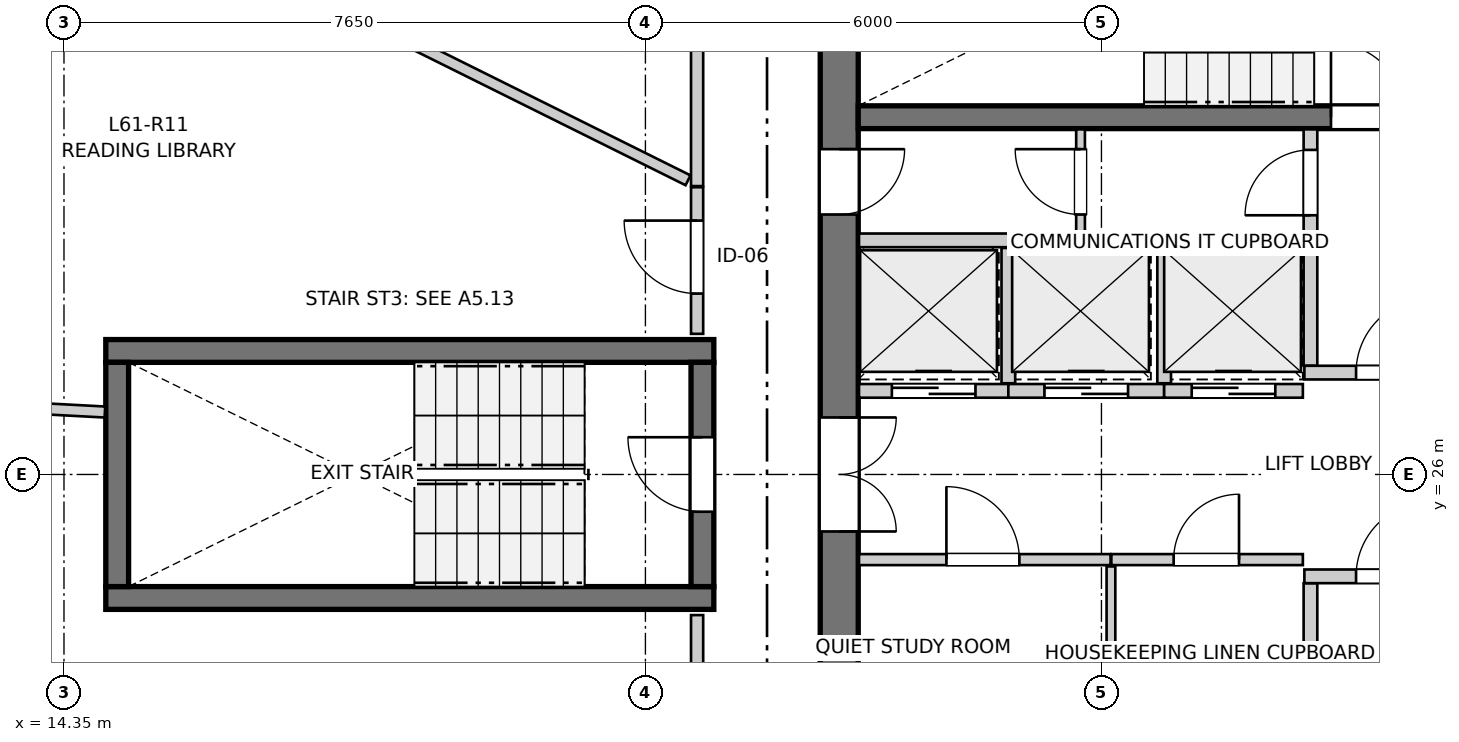
"""IFC4 building model, lengths in metres.
Left out: names, types, materials, properties, quantities, classifications, styles, units other than length and angle.
Written with IfcOpenShell. Run it as: python <this file> out.ifc"""

import sys

from ifc_helpers import new_model, si_unit, direction, frame, frame_2d, origin, place, context, subcontext, project, spatial, rectangle, extrude, source, transform, mapped, element, fill, save


model = new_model("IFC4")
c1 = context("Model", 3, precision=1e-05, world=origin(), true_north=direction((0.0, 1.0)))
c2 = subcontext(c1, "Body", "Model", "MODEL_VIEW")
j1 = project(units=[si_unit("LENGTHUNIT", "METRE"), si_unit("PLANEANGLEUNIT", "RADIAN")], contexts=[c1])
p1 = place(None, origin())
s1 = spatial("IfcSite", under=j1, at=p1, CompositionType="ELEMENT")
p2 = place(p1, origin())
s2 = spatial("IfcBuilding", under=s1, at=p2, CompositionType="ELEMENT")
p3 = place(p2, frame((0.0, 0.0, 205.2)))
s3 = spatial("IfcBuildingStorey", under=s2, at=p3, CompositionType="ELEMENT", Elevation=205.2)
p4 = place(p3, frame((24.55, 33.8, 0.0), z_axis=(0.0, 0.0, 1.0), x_axis=(0.0, -1.0, 0.0)))
e1 = element("IfcWall", 1, at=p4, inside=s3, PredefinedType="SHEAR", context=c2, shape_type="SweptSolid", body=[
    extrude(rectangle(XDim=15.6, YDim=0.5, at=frame_2d((7.8, 0.0))), origin(), (0.0, 0.0, 1.0), 2.935),
])
p5 = place(p4, frame((7.05, 0.0, 0.0)))
e2 = element("IfcOpeningElement", 2, at=p5, cuts=e1, PredefinedType="OPENING", context=c2, shape_type="SweptSolid", body=[
    extrude(rectangle(XDim=1.5, YDim=2.15, at=frame_2d((0.75, 1.075))), frame((0.0, 0.26, 0.0), z_axis=(0.0, -1.0, 0.0), x_axis=(1.0, 0.0, 0.0)), (0.0, 0.0, 1.0), 0.52),
])
p6 = place(p4, frame((3.52, 0.0, 0.0)))
e3 = element("IfcOpeningElement", 3, at=p6, cuts=e1, PredefinedType="OPENING", context=c2, shape_type="SweptSolid", body=[
    extrude(rectangle(XDim=0.86, YDim=2.05, at=frame_2d((0.43, 1.025))), frame((0.0, 0.26, 0.0), z_axis=(0.0, -1.0, 0.0), x_axis=(1.0, 0.0, 0.0)), (0.0, 0.0, 1.0), 0.52),
])
p7 = place(p4, frame((11.22, 0.0, 0.0)))
e4 = element("IfcOpeningElement", 4, at=p7, cuts=e1, PredefinedType="OPENING", context=c2, shape_type="SweptSolid", body=[
    extrude(rectangle(XDim=0.86, YDim=2.05, at=frame_2d((0.43, 1.025))), frame((0.0, 0.26, 0.0), z_axis=(0.0, -1.0, 0.0), x_axis=(1.0, 0.0, 0.0)), (0.0, 0.0, 1.0), 0.52),
])
p8 = place(p3, frame((24.8, 30.7, 0.0), z_axis=(0.0, 0.0, 1.0), x_axis=(1.0, 0.0, 0.0)))
e5 = element("IfcWall", 5, at=p8, inside=s3, PredefinedType="SHEAR", context=c2, shape_type="SweptSolid", body=[
    extrude(rectangle(XDim=11.1, YDim=0.3, at=frame_2d((5.55, 0.0))), origin(), (0.0, 0.0, 1.0), 2.935),
])
p9 = place(p8, frame((6.22, 0.0, 0.0)))
e6 = element("IfcOpeningElement", 6, at=p9, cuts=e5, PredefinedType="OPENING", context=c2, shape_type="SweptSolid", body=[
    extrude(rectangle(XDim=0.98, YDim=2.15, at=frame_2d((0.49, 1.075))), frame((0.0, 0.16, 0.0), z_axis=(0.0, -1.0, 0.0), x_axis=(1.0, 0.0, 0.0)), (0.0, 0.0, 1.0), 0.32),
])
p10 = place(p8, frame((9.15, 0.0, 0.0)))
e7 = element("IfcOpeningElement", 7, at=p10, cuts=e5, PredefinedType="OPENING", context=c2, shape_type="SweptSolid", body=[
    extrude(rectangle(XDim=1.15, YDim=2.15, at=frame_2d((0.575, 1.075))), frame((0.0, 0.16, 0.0), z_axis=(0.0, -1.0, 0.0), x_axis=(1.0, 0.0, 0.0)), (0.0, 0.0, 1.0), 0.32),
])
for number, where, z_axis, x_axis in (
    (8, (14.9, 24.375, 0.0), (0.0, 0.0, 1.0), (1.0, 0.0, 0.0)),
    (9, (22.9, 27.625, 0.0), (0.0, 0.0, 1.0), (-1.0, 0.0, 0.0)),
):
    element("IfcWall", number, at=place(p3, frame(where, z_axis=z_axis, x_axis=x_axis)), inside=s3, PredefinedType="SHEAR", context=c2, shape_type="SweptSolid", body=[
        extrude(rectangle(XDim=8.0, YDim=0.3, at=frame_2d((4.0, 0.0))), origin(), (0.0, 0.0, 1.0), 2.935),
    ])
p11 = place(p3, frame((15.05, 27.475, 0.0), z_axis=(0.0, 0.0, 1.0), x_axis=(0.0, -1.0, 0.0)))
e10 = element("IfcWall", 10, at=p11, inside=s3, PredefinedType="SHEAR", context=c2, shape_type="SweptSolid", body=[
    extrude(rectangle(XDim=2.95, YDim=0.3, at=frame_2d((1.475, 0.0))), origin(), (0.0, 0.0, 1.0), 2.935),
])
p12 = place(p3, frame((22.75, 24.525, 0.0), z_axis=(0.0, 0.0, 1.0), x_axis=(0.0, 1.0, 0.0)))
e11 = element("IfcWall", 11, at=p12, inside=s3, PredefinedType="SHEAR", context=c2, shape_type="SweptSolid", body=[
    extrude(rectangle(XDim=2.95, YDim=0.3, at=frame_2d((1.475, 0.0))), origin(), (0.0, 0.0, 1.0), 2.935),
])
p13 = place(p12, frame((0.985, 0.0, 0.0)))
e12 = element("IfcOpeningElement", 12, at=p13, cuts=e11, PredefinedType="OPENING", context=c2, shape_type="SweptSolid", body=[
    extrude(rectangle(XDim=0.98, YDim=2.15, at=frame_2d((0.49, 1.075))), frame((0.0, 0.16, 0.0), z_axis=(0.0, -1.0, 0.0), x_axis=(1.0, 0.0, 0.0)), (0.0, 0.0, 1.0), 0.32),
])
p14 = place(p3, frame((30.75, 21.46, 0.0), z_axis=(0.0, 0.0, 1.0), x_axis=(0.0, 1.0, 0.0)))
e13 = element("IfcWall", 13, at=p14, inside=s3, PredefinedType="PARTITIONING", context=c2, shape_type="SweptSolid", body=[
    extrude(rectangle(XDim=3.11, YDim=0.18, at=frame_2d((1.555, 0.0))), origin(), (0.0, 0.0, 1.0), 2.935),
])
p15 = place(p14, frame((0.26, 0.0, 0.0)))
e14 = element("IfcOpeningElement", 14, at=p15, cuts=e13, PredefinedType="OPENING", context=c2, shape_type="SweptSolid", body=[
    extrude(rectangle(XDim=0.86, YDim=2.05, at=frame_2d((0.43, 1.025))), frame((0.0, 0.1, 0.0), z_axis=(0.0, -1.0, 0.0), x_axis=(1.0, 0.0, 0.0)), (0.0, 0.0, 1.0), 0.2),
])
p16 = place(p3, frame((30.67, 24.66, 0.0), z_axis=(0.0, 0.0, 1.0), x_axis=(1.0, 0.0, 0.0)))
e15 = element("IfcWall", 15, at=p16, inside=s3, PredefinedType="PARTITIONING", context=c2, shape_type="SweptSolid", body=[
    extrude(rectangle(XDim=5.22, YDim=0.18, at=frame_2d((2.61, 0.0))), origin(), (0.0, 0.0, 1.0), 2.935),
])
p17 = place(p16, frame((0.68, 0.0, 0.0)))
e16 = element("IfcOpeningElement", 16, at=p17, cuts=e15, PredefinedType="OPENING", context=c2, shape_type="SweptSolid", body=[
    extrude(rectangle(XDim=0.98, YDim=2.15, at=frame_2d((0.49, 1.075))), frame((0.0, 0.1, 0.0), z_axis=(0.0, -1.0, 0.0), x_axis=(1.0, 0.0, 0.0)), (0.0, 0.0, 1.0), 0.2),
])
p18 = place(p3, frame((30.75, 27.43, 0.0), z_axis=(0.0, 0.0, 1.0), x_axis=(0.0, 1.0, 0.0)))
e17 = element("IfcWall", 17, at=p18, inside=s3, PredefinedType="PARTITIONING", context=c2, shape_type="SweptSolid", body=[
    extrude(rectangle(XDim=3.11, YDim=0.18, at=frame_2d((1.555, 0.0))), origin(), (0.0, 0.0, 1.0), 2.935),
])
p19 = place(p18, frame((1.98, 0.0, 0.0)))
e18 = element("IfcOpeningElement", 18, at=p19, cuts=e17, PredefinedType="OPENING", context=c2, shape_type="SweptSolid", body=[
    extrude(rectangle(XDim=0.86, YDim=2.05, at=frame_2d((0.43, 1.025))), frame((0.0, 0.1, 0.0), z_axis=(0.0, -1.0, 0.0), x_axis=(1.0, 0.0, 0.0)), (0.0, 0.0, 1.0), 0.2),
])
p20 = place(p3, frame((30.67, 27.34, 0.0), z_axis=(0.0, 0.0, 1.0), x_axis=(1.0, 0.0, 0.0)))
e19 = element("IfcWall", 19, at=p20, inside=s3, PredefinedType="PARTITIONING", context=c2, shape_type="SweptSolid", body=[
    extrude(rectangle(XDim=5.22, YDim=0.18, at=frame_2d((2.61, 0.0))), origin(), (0.0, 0.0, 1.0), 2.935),
])
p21 = place(p20, frame((0.68, 0.0, 0.0)))
e20 = element("IfcOpeningElement", 20, at=p21, cuts=e19, PredefinedType="OPENING", context=c2, shape_type="SweptSolid", body=[
    extrude(rectangle(XDim=0.98, YDim=2.15, at=frame_2d((0.49, 1.075))), frame((0.0, 0.1, 0.0), z_axis=(0.0, -1.0, 0.0), x_axis=(1.0, 0.0, 0.0)), (0.0, 0.0, 1.0), 0.2),
])
p22 = place(p3, frame((24.81, 24.88, 0.0), z_axis=(0.0, 0.0, 1.0), x_axis=(1.0, 0.0, 0.0)))
e21 = element("IfcWall", 21, at=p22, inside=s3, PredefinedType="PARTITIONING", context=c2, shape_type="SweptSolid", body=[
    extrude(rectangle(XDim=3.31, YDim=0.145, at=frame_2d((1.655, 0.0))), origin(), (0.0, 0.0, 1.0), 2.935),
])
p23 = place(p22, frame((1.15, 0.0, 0.0)))
e22 = element("IfcOpeningElement", 22, at=p23, cuts=e21, PredefinedType="OPENING", context=c2, shape_type="SweptSolid", body=[
    extrude(rectangle(XDim=0.96, YDim=2.1, at=frame_2d((0.48, 1.05))), frame((0.0, 0.083, 0.0), z_axis=(0.0, -1.0, 0.0), x_axis=(1.0, 0.0, 0.0)), (0.0, 0.0, 1.0), 0.165),
])
p24 = place(p3, frame((28.13, 24.88, 0.0), z_axis=(0.0, 0.0, 1.0), x_axis=(1.0, 0.0, 0.0)))
e23 = element("IfcWall", 23, at=p24, inside=s3, PredefinedType="PARTITIONING", context=c2, shape_type="SweptSolid", body=[
    extrude(rectangle(XDim=2.52, YDim=0.145, at=frame_2d((1.26, 0.0))), origin(), (0.0, 0.0, 1.0), 2.935),
])
p25 = place(p24, frame((0.82, 0.0, 0.0)))
e24 = element("IfcOpeningElement", 24, at=p25, cuts=e23, PredefinedType="OPENING", context=c2, shape_type="SweptSolid", body=[
    extrude(rectangle(XDim=0.86, YDim=2.05, at=frame_2d((0.43, 1.025))), frame((0.0, 0.083, 0.0), z_axis=(0.0, -1.0, 0.0), x_axis=(1.0, 0.0, 0.0)), (0.0, 0.0, 1.0), 0.165),
])
p26 = place(p3, frame((28.125, 23.02, 0.0), z_axis=(0.0, 0.0, 1.0), x_axis=(0.0, 1.0, 0.0)))
e25 = element("IfcWall", 25, at=p26, inside=s3, PredefinedType="PARTITIONING", context=c2, shape_type="SweptSolid", body=[
    extrude(rectangle(XDim=1.77, YDim=0.115, at=frame_2d((0.885, 0.0))), origin(), (0.0, 0.0, 1.0), 2.935),
])
p27 = place(p3, frame((24.81, 29.08, 0.0), z_axis=(0.0, 0.0, 1.0), x_axis=(1.0, 0.0, 0.0)))
e26 = element("IfcWall", 26, at=p27, inside=s3, PredefinedType="PARTITIONING", context=c2, shape_type="SweptSolid", body=[
    extrude(rectangle(XDim=5.84, YDim=0.18, at=frame_2d((2.92, 0.0))), origin(), (0.0, 0.0, 1.0), 2.935),
])
p28 = place(p3, frame((24.81, 27.1, 0.0), z_axis=(0.0, 0.0, 1.0), x_axis=(1.0, 0.0, 0.0)))
e27 = element("IfcWall", 27, at=p28, inside=s3, PredefinedType="PARTITIONING", context=c2, shape_type="SweptSolid", body=[
    extrude(rectangle(XDim=1.965, YDim=0.18, at=frame_2d((0.982, 0.0))), origin(), (0.0, 0.0, 1.0), 2.935),
])
p29 = place(p28, frame((0.433, 0.0, 0.0)))
e28 = element("IfcOpeningElement", 28, at=p29, cuts=e27, PredefinedType="OPENING", context=c2, shape_type="SweptSolid", body=[
    extrude(rectangle(XDim=1.1, YDim=2.15, at=frame_2d((0.55, 1.075))), frame((0.0, 0.1, 0.0), z_axis=(0.0, -1.0, 0.0), x_axis=(1.0, 0.0, 0.0)), (0.0, 0.0, 1.0), 0.2),
])
p30 = place(p3, frame((26.775, 27.1, 0.0), z_axis=(0.0, 0.0, 1.0), x_axis=(1.0, 0.0, 0.0)))
e29 = element("IfcWall", 29, at=p30, inside=s3, PredefinedType="PARTITIONING", context=c2, shape_type="SweptSolid", body=[
    extrude(rectangle(XDim=2.05, YDim=0.18, at=frame_2d((1.025, 0.0))), origin(), (0.0, 0.0, 1.0), 2.935),
])
p31 = place(p30, frame((0.475, 0.0, 0.0)))
e30 = element("IfcOpeningElement", 30, at=p31, cuts=e29, PredefinedType="OPENING", context=c2, shape_type="SweptSolid", body=[
    extrude(rectangle(XDim=1.1, YDim=2.15, at=frame_2d((0.55, 1.075))), frame((0.0, 0.1, 0.0), z_axis=(0.0, -1.0, 0.0), x_axis=(1.0, 0.0, 0.0)), (0.0, 0.0, 1.0), 0.2),
])
p32 = place(p3, frame((26.775, 27.2, 0.0), z_axis=(0.0, 0.0, 1.0), x_axis=(0.0, 1.0, 0.0)))
e31 = element("IfcWall", 31, at=p32, inside=s3, PredefinedType="PARTITIONING", context=c2, shape_type="SweptSolid", body=[
    extrude(rectangle(XDim=1.78, YDim=0.18, at=frame_2d((0.89, 0.0))), origin(), (0.0, 0.0, 1.0), 2.935),
])
p33 = place(p3, frame((28.825, 27.1, 0.0), z_axis=(0.0, 0.0, 1.0), x_axis=(1.0, 0.0, 0.0)))
e32 = element("IfcWall", 32, at=p33, inside=s3, PredefinedType="PARTITIONING", context=c2, shape_type="SweptSolid", body=[
    extrude(rectangle(XDim=1.825, YDim=0.18, at=frame_2d((0.913, 0.0))), origin(), (0.0, 0.0, 1.0), 2.935),
])
p34 = place(p33, frame((0.363, 0.0, 0.0)))
e33 = element("IfcOpeningElement", 33, at=p34, cuts=e32, PredefinedType="OPENING", context=c2, shape_type="SweptSolid", body=[
    extrude(rectangle(XDim=1.1, YDim=2.15, at=frame_2d((0.55, 1.075))), frame((0.0, 0.1, 0.0), z_axis=(0.0, -1.0, 0.0), x_axis=(1.0, 0.0, 0.0)), (0.0, 0.0, 1.0), 0.2),
])
p35 = place(p3, frame((28.825, 27.2, 0.0), z_axis=(0.0, 0.0, 1.0), x_axis=(0.0, 1.0, 0.0)))
e34 = element("IfcWall", 34, at=p35, inside=s3, PredefinedType="PARTITIONING", context=c2, shape_type="SweptSolid", body=[
    extrude(rectangle(XDim=1.78, YDim=0.18, at=frame_2d((0.89, 0.0))), origin(), (0.0, 0.0, 1.0), 2.935),
])
p36 = place(p3, frame((27.725, 29.16, 0.0), z_axis=(0.0, 0.0, 1.0), x_axis=(0.0, 1.0, 0.0)))
e35 = element("IfcWall", 35, at=p36, inside=s3, PredefinedType="PARTITIONING", context=c2, shape_type="SweptSolid", body=[
    extrude(rectangle(XDim=1.38, YDim=0.115, at=frame_2d((0.69, 0.0))), origin(), (0.0, 0.0, 1.0), 2.935),
])
p37 = place(p36, frame((0.26, 0.0, 0.0)))
e36 = element("IfcOpeningElement", 36, at=p37, cuts=e35, PredefinedType="OPENING", context=c2, shape_type="SweptSolid", body=[
    extrude(rectangle(XDim=0.86, YDim=2.05, at=frame_2d((0.43, 1.025))), frame((0.0, 0.067, 0.0), z_axis=(0.0, -1.0, 0.0), x_axis=(1.0, 0.0, 0.0)), (0.0, 0.0, 1.0), 0.135),
])
p38 = place(p3, frame((22.68, 19.52, 0.0), z_axis=(0.0, 0.0, 1.0), x_axis=(0.0, 1.0, 0.0)))
e37 = element("IfcWall", 37, at=p38, inside=s3, PredefinedType="PARTITIONING", context=c2, shape_type="SweptSolid", body=[
    extrude(rectangle(XDim=4.63, YDim=0.16, at=frame_2d((2.315, 0.0))), origin(), (0.0, 0.0, 1.0), 2.935),
])
p39 = place(p38, frame((1.357, 0.0, 0.0)))
e38 = element("IfcOpeningElement", 38, at=p39, cuts=e37, PredefinedType="OPENING", context=c2, shape_type="SweptSolid", body=[
    extrude(rectangle(XDim=1.3, YDim=2.1, at=frame_2d((0.65, 1.05))), frame((0.0, 0.09, 0.0), z_axis=(0.0, -1.0, 0.0), x_axis=(1.0, 0.0, 0.0)), (0.0, 0.0, 1.0), 0.18),
])
p40 = place(p3, frame((22.68, 29.794, 0.0), z_axis=(0.0, 0.0, 1.0), x_axis=(0.0, 1.0, 0.0)))
e39 = element("IfcWall", 39, at=p40, inside=s3, PredefinedType="PARTITIONING", context=c2, shape_type="SweptSolid", body=[
    extrude(rectangle(XDim=4.506, YDim=0.16, at=frame_2d((2.253, 0.0))), origin(), (0.0, 0.0, 1.0), 2.935),
])
p41 = place(p40, frame((1.781, 0.0, 0.0)))
e40 = element("IfcOpeningElement", 40, at=p41, cuts=e39, PredefinedType="OPENING", context=c2, shape_type="SweptSolid", body=[
    extrude(rectangle(XDim=0.96, YDim=2.1, at=frame_2d((0.48, 1.05))), frame((0.0, 0.09, 0.0), z_axis=(0.0, -1.0, 0.0), x_axis=(1.0, 0.0, 0.0)), (0.0, 0.0, 1.0), 0.18),
])
p42 = place(p3, frame((22.68, 27.85, 0.0), z_axis=(0.0, 0.0, 1.0), x_axis=(0.0, 1.0, 0.0)))
e41 = element("IfcWall", 41, at=p42, inside=s3, PredefinedType="PARTITIONING", context=c2, shape_type="SweptSolid", body=[
    extrude(rectangle(XDim=1.929, YDim=0.16, at=frame_2d((0.964, 0.0))), origin(), (0.0, 0.0, 1.0), 2.935),
])
p43 = place(p42, frame((0.53, 0.0, 0.0)))
e42 = element("IfcOpeningElement", 42, at=p43, cuts=e41, PredefinedType="OPENING", context=c2, shape_type="SweptSolid", body=[
    extrude(rectangle(XDim=0.96, YDim=2.1, at=frame_2d((0.48, 1.05))), frame((0.0, 0.09, 0.0), z_axis=(0.0, -1.0, 0.0), x_axis=(1.0, 0.0, 0.0)), (0.0, 0.0, 1.0), 0.18),
])
p44 = place(p3, frame((14.759, 33.747, 0.0), z_axis=(0.0, 0.0, 1.0), x_axis=(0.895550902793, -0.44495907734, 0.0)))
e43 = element("IfcWall", 43, at=p44, inside=s3, PredefinedType="PARTITIONING", context=c2, shape_type="SweptSolid", body=[
    extrude(rectangle(XDim=8.712, YDim=0.145, at=frame_2d((4.356, 0.0))), origin(), (0.0, 0.0, 1.0), 2.935),
])
p45 = place(p3, frame((9.433, 27.112, 0.0), z_axis=(0.0, 0.0, 1.0), x_axis=(0.998589537807, -0.053093643525, 0.0)))
e44 = element("IfcWall", 44, at=p45, inside=s3, PredefinedType="PARTITIONING", context=c2, shape_type="SweptSolid", body=[
    extrude(rectangle(XDim=5.463, YDim=0.145, at=frame_2d((2.731, 0.0))), origin(), (0.0, 0.0, 1.0), 2.935),
])
m1 = source(origin(), c2, "Body", "SweptSolid", [
    extrude(rectangle(XDim=0.98, YDim=2.15, at=frame_2d((0.49, 1.075))), frame((0.0, 0.025, 0.0), z_axis=(0.0, -1.0, 0.0), x_axis=(1.0, 0.0, 0.0)), (0.0, 0.0, 1.0), 0.05),
])
p46 = place(p9, origin())
e45 = element("IfcDoor", 45, at=p46, inside=s3, OperationType="SINGLE_SWING_LEFT", PredefinedType="DOOR", context=c2, shape_type="MappedRepresentation", body=[
    mapped(m1, transform((0.0, 0.0, 0.0), x_axis=(1.0, 0.0, 0.0), y_axis=(0.0, 1.0, 0.0), z_axis=(0.0, 0.0, 1.0), scale=1.0)),
])
fill(e6, e45)
p47 = place(p13, origin())
e46 = element("IfcDoor", 46, at=p47, inside=s3, OperationType="SINGLE_SWING_RIGHT", PredefinedType="DOOR", context=c2, shape_type="MappedRepresentation", body=[
    mapped(m1, transform((0.0, 0.0, 0.0), x_axis=(1.0, 0.0, 0.0), y_axis=(0.0, 1.0, 0.0), z_axis=(0.0, 0.0, 1.0), scale=1.0)),
])
fill(e12, e46)
m2 = source(origin(), c2, "Body", "SweptSolid", [
    extrude(rectangle(XDim=1.5, YDim=2.15, at=frame_2d((0.75, 1.075))), frame((0.0, 0.025, 0.0), z_axis=(0.0, -1.0, 0.0), x_axis=(1.0, 0.0, 0.0)), (0.0, 0.0, 1.0), 0.05),
])
p48 = place(p5, origin())
e47 = element("IfcDoor", 47, at=p48, inside=s3, OperationType="DOUBLE_DOOR_SINGLE_SWING", PredefinedType="DOOR", context=c2, shape_type="MappedRepresentation", body=[
    mapped(m2, transform((0.0, 0.0, 0.0), x_axis=(1.0, 0.0, 0.0), y_axis=(0.0, 1.0, 0.0), z_axis=(0.0, 0.0, 1.0), scale=1.0)),
])
fill(e2, e47)
m3 = source(origin(), c2, "Body", "SweptSolid", [
    extrude(rectangle(XDim=0.86, YDim=2.05, at=frame_2d((0.43, 1.025))), frame((0.0, 0.025, 0.0), z_axis=(0.0, -1.0, 0.0), x_axis=(1.0, 0.0, 0.0)), (0.0, 0.0, 1.0), 0.05),
])
p49 = place(p6, origin())
e48 = element("IfcDoor", 48, at=p49, inside=s3, OperationType="SINGLE_SWING_LEFT", PredefinedType="DOOR", context=c2, shape_type="MappedRepresentation", body=[
    mapped(m3, transform((0.0, 0.0, 0.0), x_axis=(1.0, 0.0, 0.0), y_axis=(0.0, 1.0, 0.0), z_axis=(0.0, 0.0, 1.0), scale=1.0)),
])
fill(e3, e48)
p50 = place(p17, origin())
e49 = element("IfcDoor", 49, at=p50, inside=s3, OperationType="SINGLE_SWING_RIGHT", PredefinedType="DOOR", context=c2, shape_type="MappedRepresentation", body=[
    mapped(m1, transform((0.0, 0.0, 0.0), x_axis=(1.0, 0.0, 0.0), y_axis=(0.0, 1.0, 0.0), z_axis=(0.0, 0.0, 1.0), scale=1.0)),
])
fill(e16, e49)
p51 = place(p19, origin())
e50 = element("IfcDoor", 50, at=p51, inside=s3, OperationType="SINGLE_SWING_LEFT", PredefinedType="DOOR", context=c2, shape_type="MappedRepresentation", body=[
    mapped(m3, transform((0.0, 0.0, 0.0), x_axis=(1.0, 0.0, 0.0), y_axis=(0.0, 1.0, 0.0), z_axis=(0.0, 0.0, 1.0), scale=1.0)),
])
fill(e18, e50)
p52 = place(p21, origin())
e51 = element("IfcDoor", 51, at=p52, inside=s3, OperationType="SINGLE_SWING_RIGHT", PredefinedType="DOOR", context=c2, shape_type="MappedRepresentation", body=[
    mapped(m1, transform((0.0, 0.0, 0.0), x_axis=(1.0, 0.0, 0.0), y_axis=(0.0, 1.0, 0.0), z_axis=(0.0, 0.0, 1.0), scale=1.0)),
])
fill(e20, e51)
m4 = source(origin(), c2, "Body", "SweptSolid", [
    extrude(rectangle(XDim=0.96, YDim=2.1, at=frame_2d((0.48, 1.05))), frame((0.0, 0.025, 0.0), z_axis=(0.0, -1.0, 0.0), x_axis=(1.0, 0.0, 0.0)), (0.0, 0.0, 1.0), 0.05),
])
p53 = place(p23, origin())
e52 = element("IfcDoor", 52, at=p53, inside=s3, OperationType="SINGLE_SWING_LEFT", PredefinedType="DOOR", context=c2, shape_type="MappedRepresentation", body=[
    mapped(m4, transform((0.0, 0.0, 0.0), x_axis=(1.0, 0.0, 0.0), y_axis=(0.0, 1.0, 0.0), z_axis=(0.0, 0.0, 1.0), scale=1.0)),
])
fill(e22, e52)
p54 = place(p25, origin())
e53 = element("IfcDoor", 53, at=p54, inside=s3, OperationType="SINGLE_SWING_RIGHT", PredefinedType="DOOR", context=c2, shape_type="MappedRepresentation", body=[
    mapped(m3, transform((0.0, 0.0, 0.0), x_axis=(1.0, 0.0, 0.0), y_axis=(0.0, 1.0, 0.0), z_axis=(0.0, 0.0, 1.0), scale=1.0)),
])
fill(e24, e53)
m5 = source(origin(), c2, "Body", "SweptSolid", [
    extrude(rectangle(XDim=1.1, YDim=2.15, at=frame_2d((0.55, 1.075))), frame((0.0, 0.025, 0.0), z_axis=(0.0, -1.0, 0.0), x_axis=(1.0, 0.0, 0.0)), (0.0, 0.0, 1.0), 0.05),
])
p55 = place(p29, origin())
e54 = element("IfcDoor", 54, at=p55, inside=s3, OperationType="DOUBLE_DOOR_SLIDING", PredefinedType="DOOR", context=c2, shape_type="MappedRepresentation", body=[
    mapped(m5, transform((0.0, 0.0, 0.0), x_axis=(1.0, 0.0, 0.0), y_axis=(0.0, 1.0, 0.0), z_axis=(0.0, 0.0, 1.0), scale=1.0)),
])
fill(e28, e54)
p56 = place(p31, origin())
e55 = element("IfcDoor", 55, at=p56, inside=s3, OperationType="DOUBLE_DOOR_SLIDING", PredefinedType="DOOR", context=c2, shape_type="MappedRepresentation", body=[
    mapped(m5, transform((0.0, 0.0, 0.0), x_axis=(1.0, 0.0, 0.0), y_axis=(0.0, 1.0, 0.0), z_axis=(0.0, 0.0, 1.0), scale=1.0)),
])
fill(e30, e55)
p57 = place(p34, origin())
e56 = element("IfcDoor", 56, at=p57, inside=s3, OperationType="DOUBLE_DOOR_SLIDING", PredefinedType="DOOR", context=c2, shape_type="MappedRepresentation", body=[
    mapped(m5, transform((0.0, 0.0, 0.0), x_axis=(1.0, 0.0, 0.0), y_axis=(0.0, 1.0, 0.0), z_axis=(0.0, 0.0, 1.0), scale=1.0)),
])
fill(e33, e56)
p58 = place(p37, origin())
e57 = element("IfcDoor", 57, at=p58, inside=s3, OperationType="SINGLE_SWING_RIGHT", PredefinedType="DOOR", context=c2, shape_type="MappedRepresentation", body=[
    mapped(m3, transform((0.0, 0.0, 0.0), x_axis=(1.0, 0.0, 0.0), y_axis=(0.0, 1.0, 0.0), z_axis=(0.0, 0.0, 1.0), scale=1.0)),
])
fill(e36, e57)
p59 = place(p43, origin())
e58 = element("IfcDoor", 58, at=p59, inside=s3, OperationType="SINGLE_SWING_RIGHT", PredefinedType="DOOR", context=c2, shape_type="MappedRepresentation", body=[
    mapped(m4, transform((0.0, 0.0, 0.0), x_axis=(1.0, 0.0, 0.0), y_axis=(0.0, 1.0, 0.0), z_axis=(0.0, 0.0, 1.0), scale=1.0)),
])
fill(e42, e58)
save(model, sys.argv[1])
